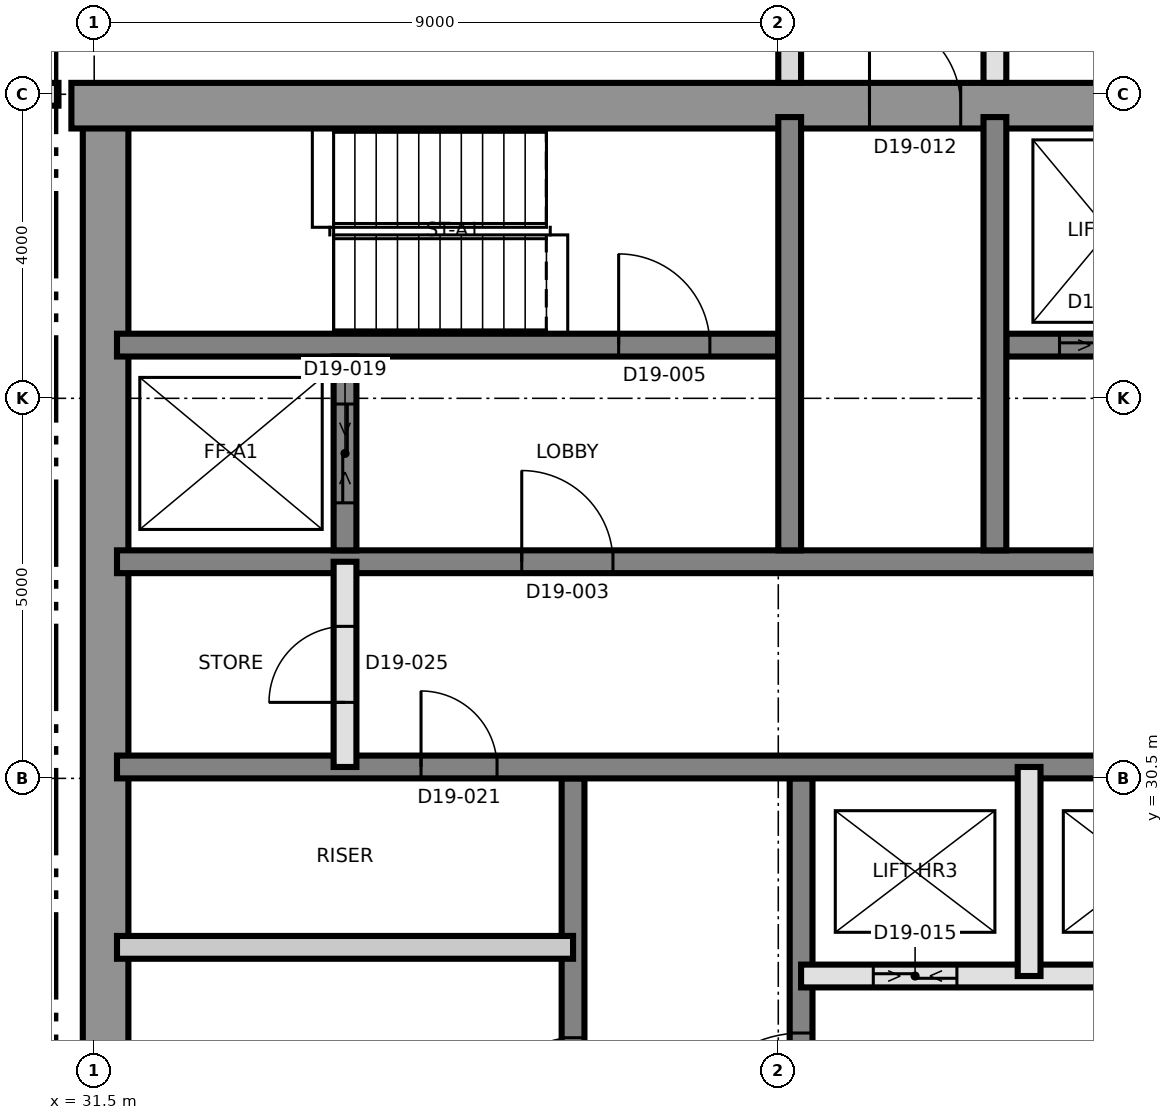
"""IFC4 building model, lengths in metres.
Left out: names, types, materials, properties, quantities, classifications, styles, units other than length and angle.
Written with IfcOpenShell. Run it as: python <this file> out.ifc"""

import sys

from ifc_helpers import new_model, si_unit, direction, frame, frame_2d, origin, place, context, subcontext, project, spatial, rectangle, extrude, element, fill, save


model = new_model("IFC4")
c1 = context("Model", 3, precision=1e-05, world=origin(), true_north=direction((0.0, 1.0)))
c2 = subcontext(c1, "Body", "Model", "MODEL_VIEW")
j1 = project(units=[si_unit("LENGTHUNIT", "METRE"), si_unit("PLANEANGLEUNIT", "RADIAN")], contexts=[c1])
p1 = place(None, origin())
s1 = spatial("IfcSite", under=j1, at=p1, CompositionType="ELEMENT")
p2 = place(p1, origin())
s2 = spatial("IfcBuilding", under=s1, at=p2, CompositionType="ELEMENT")
p3 = place(p2, frame((0.0, 0.0, 179.2)))
s3 = spatial("IfcBuildingStorey", under=s2, at=p3, CompositionType="ELEMENT", Elevation=179.2)
p4 = place(p3, frame((31.65, 21.8, 0.0), z_axis=(0.0, 0.0, 1.0), x_axis=(0.0, 1.0, 0.0)))
e1 = element("IfcWall", 1, at=p4, inside=s3, PredefinedType="SHEAR", context=c2, shape_type="SweptSolid", body=[
    extrude(rectangle(XDim=17.4, YDim=0.6, at=frame_2d((8.7, 0.0))), origin(), (0.0, 0.0, 1.0), 3.7),
])
p5 = place(p3, frame((31.2, 39.35, 0.0), z_axis=(0.0, 0.0, 1.0), x_axis=(1.0, 0.0, 0.0)))
e2 = element("IfcWall", 2, at=p5, inside=s3, PredefinedType="SHEAR", context=c2, shape_type="SweptSolid", body=[
    extrude(rectangle(XDim=27.0, YDim=0.6, at=frame_2d((13.5, 0.0))), origin(), (0.0, 0.0, 1.0), 3.7),
])
p6 = place(p5, frame((10.5, 0.0, 0.0)))
e3 = element("IfcOpeningElement", 3, at=p6, cuts=e2, PredefinedType="OPENING", context=c2, shape_type="SweptSolid", body=[
    extrude(rectangle(XDim=1.2, YDim=2.1, at=frame_2d((0.6, 1.05))), frame((0.0, 0.31, 0.0), z_axis=(0.0, -1.0, 0.0), x_axis=(1.0, 0.0, 0.0)), (0.0, 0.0, 1.0), 0.62),
])
p7 = place(p3, frame((37.8, 21.8, 0.0), z_axis=(0.0, 0.0, 1.0), x_axis=(0.0, 1.0, 0.0)))
e4 = element("IfcWall", 4, at=p7, inside=s3, PredefinedType="SHEAR", context=c2, shape_type="SweptSolid", body=[
    extrude(rectangle(XDim=8.7, YDim=0.3, at=frame_2d((4.35, 0.0))), origin(), (0.0, 0.0, 1.0), 3.7),
])
p8 = place(p7, frame((4.288, 0.0, 0.0)))
e5 = element("IfcOpeningElement", 5, at=p8, cuts=e4, PredefinedType="OPENING", context=c2, shape_type="SweptSolid", body=[
    extrude(rectangle(XDim=1.0, YDim=2.1, at=frame_2d((0.5, 1.05))), frame((0.0, 0.16, 0.0), z_axis=(0.0, -1.0, 0.0), x_axis=(1.0, 0.0, 0.0)), (0.0, 0.0, 1.0), 0.32),
])
p9 = place(p3, frame((40.8, 21.8, 0.0), z_axis=(0.0, 0.0, 1.0), x_axis=(0.0, 1.0, 0.0)))
e6 = element("IfcWall", 6, at=p9, inside=s3, PredefinedType="SHEAR", context=c2, shape_type="SweptSolid", body=[
    extrude(rectangle(XDim=8.7, YDim=0.3, at=frame_2d((4.35, 0.0))), origin(), (0.0, 0.0, 1.0), 3.7),
])
p10 = place(p9, frame((3.85, 0.0, 0.0)))
e7 = element("IfcOpeningElement", 7, at=p10, cuts=e6, PredefinedType="OPENING", context=c2, shape_type="SweptSolid", body=[
    extrude(rectangle(XDim=1.5, YDim=2.1, at=frame_2d((0.75, 1.05))), frame((0.0, 0.16, 0.0), z_axis=(0.0, -1.0, 0.0), x_axis=(1.0, 0.0, 0.0)), (0.0, 0.0, 1.0), 0.32),
])
p11 = place(p3, frame((31.8, 30.65, 0.0), z_axis=(0.0, 0.0, 1.0), x_axis=(1.0, 0.0, 0.0)))
e8 = element("IfcWall", 8, at=p11, inside=s3, PredefinedType="SHEAR", context=c2, shape_type="SweptSolid", body=[
    extrude(rectangle(XDim=26.4, YDim=0.3, at=frame_2d((13.2, 0.0))), origin(), (0.0, 0.0, 1.0), 3.7),
])
p12 = place(p11, frame((24.7, 0.0, 0.0)))
e9 = element("IfcOpeningElement", 9, at=p12, cuts=e8, PredefinedType="OPENING", context=c2, shape_type="SweptSolid", body=[
    extrude(rectangle(XDim=1.0, YDim=2.1, at=frame_2d((0.5, 1.05))), frame((0.0, 0.16, 0.0), z_axis=(0.0, -1.0, 0.0), x_axis=(1.0, 0.0, 0.0)), (0.0, 0.0, 1.0), 0.32),
])
p13 = place(p11, frame((4.0, 0.0, 0.0)))
e10 = element("IfcOpeningElement", 10, at=p13, cuts=e8, PredefinedType="OPENING", context=c2, shape_type="SweptSolid", body=[
    extrude(rectangle(XDim=1.0, YDim=2.1, at=frame_2d((0.5, 1.05))), frame((0.0, 0.16, 0.0), z_axis=(0.0, -1.0, 0.0), x_axis=(1.0, 0.0, 0.0)), (0.0, 0.0, 1.0), 0.32),
])
p14 = place(p3, frame((31.8, 33.35, 0.0), z_axis=(0.0, 0.0, 1.0), x_axis=(1.0, 0.0, 0.0)))
e11 = element("IfcWall", 11, at=p14, inside=s3, PredefinedType="SHEAR", context=c2, shape_type="SweptSolid", body=[
    extrude(rectangle(XDim=26.4, YDim=0.3, at=frame_2d((13.2, 0.0))), origin(), (0.0, 0.0, 1.0), 3.7),
])
p15 = place(p14, frame((13.85, 0.0, 0.0)))
e12 = element("IfcOpeningElement", 12, at=p15, cuts=e11, PredefinedType="OPENING", context=c2, shape_type="SweptSolid", body=[
    extrude(rectangle(XDim=1.4, YDim=2.1, at=frame_2d((0.7, 1.05))), frame((0.0, 0.16, 0.0), z_axis=(0.0, -1.0, 0.0), x_axis=(1.0, 0.0, 0.0)), (0.0, 0.0, 1.0), 0.32),
])
p16 = place(p14, frame((5.325, 0.0, 0.0)))
e13 = element("IfcOpeningElement", 13, at=p16, cuts=e11, PredefinedType="OPENING", context=c2, shape_type="SweptSolid", body=[
    extrude(rectangle(XDim=1.2, YDim=2.1, at=frame_2d((0.6, 1.05))), frame((0.0, 0.16, 0.0), z_axis=(0.0, -1.0, 0.0), x_axis=(1.0, 0.0, 0.0)), (0.0, 0.0, 1.0), 0.32),
])
p17 = place(p14, frame((19.875, 0.0, 0.0)))
e14 = element("IfcOpeningElement", 14, at=p17, cuts=e11, PredefinedType="OPENING", context=c2, shape_type="SweptSolid", body=[
    extrude(rectangle(XDim=1.2, YDim=2.1, at=frame_2d((0.6, 1.05))), frame((0.0, 0.16, 0.0), z_axis=(0.0, -1.0, 0.0), x_axis=(1.0, 0.0, 0.0)), (0.0, 0.0, 1.0), 0.32),
])
p18 = place(p3, frame((31.8, 36.2, 0.0), z_axis=(0.0, 0.0, 1.0), x_axis=(1.0, 0.0, 0.0)))
e15 = element("IfcWall", 15, at=p18, inside=s3, PredefinedType="SHEAR", context=c2, shape_type="SweptSolid", body=[
    extrude(rectangle(XDim=8.7, YDim=0.3, at=frame_2d((4.35, 0.0))), origin(), (0.0, 0.0, 1.0), 3.7),
])
p19 = place(p18, frame((6.6, 0.0, 0.0)))
e16 = element("IfcOpeningElement", 16, at=p19, cuts=e15, PredefinedType="OPENING", context=c2, shape_type="SweptSolid", body=[
    extrude(rectangle(XDim=1.2, YDim=2.1, at=frame_2d((0.6, 1.05))), frame((0.0, 0.16, 0.0), z_axis=(0.0, -1.0, 0.0), x_axis=(1.0, 0.0, 0.0)), (0.0, 0.0, 1.0), 0.32),
])
p20 = place(p3, frame((43.5, 36.2, 0.0), z_axis=(0.0, 0.0, 1.0), x_axis=(1.0, 0.0, 0.0)))
e17 = element("IfcWall", 17, at=p20, inside=s3, PredefinedType="SHEAR", context=c2, shape_type="SweptSolid", body=[
    extrude(rectangle(XDim=14.7, YDim=0.3, at=frame_2d((7.35, 0.0))), origin(), (0.0, 0.0, 1.0), 3.7),
])
p21 = place(p20, frame((6.9, 0.0, 0.0)))
e18 = element("IfcOpeningElement", 18, at=p21, cuts=e17, PredefinedType="OPENING", context=c2, shape_type="SweptSolid", body=[
    extrude(rectangle(XDim=1.2, YDim=2.1, at=frame_2d((0.6, 1.05))), frame((0.0, 0.16, 0.0), z_axis=(0.0, -1.0, 0.0), x_axis=(1.0, 0.0, 0.0)), (0.0, 0.0, 1.0), 0.32),
])
p22 = place(p20, frame((0.7, 0.0, 0.0)))
e19 = element("IfcOpeningElement", 19, at=p22, cuts=e17, PredefinedType="OPENING", context=c2, shape_type="SweptSolid", body=[
    extrude(rectangle(XDim=1.3, YDim=2.4, at=frame_2d((0.65, 1.2))), frame((0.0, 0.16, 0.0), z_axis=(0.0, -1.0, 0.0), x_axis=(1.0, 0.0, 0.0)), (0.0, 0.0, 1.0), 0.32),
])
p23 = place(p20, frame((3.7, 0.0, 0.0)))
e20 = element("IfcOpeningElement", 20, at=p23, cuts=e17, PredefinedType="OPENING", context=c2, shape_type="SweptSolid", body=[
    extrude(rectangle(XDim=1.3, YDim=2.4, at=frame_2d((0.65, 1.2))), frame((0.0, 0.16, 0.0), z_axis=(0.0, -1.0, 0.0), x_axis=(1.0, 0.0, 0.0)), (0.0, 0.0, 1.0), 0.32),
])
for number, where, z_axis, x_axis in (
    (21, (40.65, 33.5, 0.0), (0.0, 0.0, 1.0), (0.0, 1.0, 0.0)),
    (22, (43.35, 33.5, 0.0), (0.0, 0.0, 1.0), (0.0, 1.0, 0.0)),
):
    element("IfcWall", number, at=place(p3, frame(where, z_axis=z_axis, x_axis=x_axis)), inside=s3, PredefinedType="SHEAR", context=c2, shape_type="SweptSolid", body=[
        extrude(rectangle(XDim=5.7, YDim=0.3, at=frame_2d((2.85, 0.0))), origin(), (0.0, 0.0, 1.0), 3.7),
    ])
p24 = place(p3, frame((34.8, 33.5, 0.0), z_axis=(0.0, 0.0, 1.0), x_axis=(0.0, 1.0, 0.0)))
e23 = element("IfcWall", 23, at=p24, inside=s3, PredefinedType="SHEAR", context=c2, shape_type="SweptSolid", body=[
    extrude(rectangle(XDim=2.55, YDim=0.3, at=frame_2d((1.275, 0.0))), origin(), (0.0, 0.0, 1.0), 3.7),
])
p25 = place(p24, frame((0.625, 0.0, 0.0)))
e24 = element("IfcOpeningElement", 24, at=p25, cuts=e23, PredefinedType="OPENING", context=c2, shape_type="SweptSolid", body=[
    extrude(rectangle(XDim=1.3, YDim=2.4, at=frame_2d((0.65, 1.2))), frame((0.0, 0.16, 0.0), z_axis=(0.0, -1.0, 0.0), x_axis=(1.0, 0.0, 0.0)), (0.0, 0.0, 1.0), 0.32),
])
p26 = place(p3, frame((30.119, 28.24, 0.0), z_axis=(0.0, 0.0, 1.0), x_axis=(0.442319080682, -0.896857753975, 0.0)))
e25 = element("IfcWall", 25, at=p26, inside=s3, PredefinedType="SOLIDWALL", context=c2, shape_type="SweptSolid", body=[
    extrude(rectangle(XDim=1.618, YDim=0.3, at=frame_2d((0.809, 0.0))), origin(), (0.0, 0.0, 1.0), 3.4),
])
p27 = place(p3, frame((40.8, 27.9, 0.0), z_axis=(0.0, 0.0, 1.0), x_axis=(1.0, 0.0, 0.0)))
e26 = element("IfcWall", 26, at=p27, inside=s3, PredefinedType="SOLIDWALL", context=c2, shape_type="SweptSolid", body=[
    extrude(rectangle(XDim=6.0, YDim=0.3, at=frame_2d((3.0, 0.0))), origin(), (0.0, 0.0, 1.0), 3.4),
])
p28 = place(p27, frame((0.95, 0.0, 0.0)))
e27 = element("IfcOpeningElement", 27, at=p28, cuts=e26, PredefinedType="OPENING", context=c2, shape_type="SweptSolid", body=[
    extrude(rectangle(XDim=1.1, YDim=2.4, at=frame_2d((0.55, 1.2))), frame((0.0, 0.16, 0.0), z_axis=(0.0, -1.0, 0.0), x_axis=(1.0, 0.0, 0.0)), (0.0, 0.0, 1.0), 0.32),
])
p29 = place(p27, frame((3.95, 0.0, 0.0)))
e28 = element("IfcOpeningElement", 28, at=p29, cuts=e26, PredefinedType="OPENING", context=c2, shape_type="SweptSolid", body=[
    extrude(rectangle(XDim=1.1, YDim=2.4, at=frame_2d((0.55, 1.2))), frame((0.0, 0.16, 0.0), z_axis=(0.0, -1.0, 0.0), x_axis=(1.0, 0.0, 0.0)), (0.0, 0.0, 1.0), 0.32),
])
p30 = place(p3, frame((31.8, 28.277, 0.0), z_axis=(0.0, 0.0, 1.0), x_axis=(1.0, 0.0, 0.0)))
e29 = element("IfcWall", 29, at=p30, inside=s3, PredefinedType="PARTITIONING", context=c2, shape_type="SweptSolid", body=[
    extrude(rectangle(XDim=6.0, YDim=0.3, at=frame_2d((3.0, 0.0))), origin(), (0.0, 0.0, 1.0), 3.4),
])
p31 = place(p3, frame((34.8, 30.65, 0.0), z_axis=(0.0, 0.0, 1.0), x_axis=(0.0, 1.0, 0.0)))
e30 = element("IfcWall", 30, at=p31, inside=s3, PredefinedType="SOLIDWALL", context=c2, shape_type="SweptSolid", body=[
    extrude(rectangle(XDim=2.7, YDim=0.3, at=frame_2d((1.35, 0.0))), origin(), (0.0, 0.0, 1.0), 3.4),
])
p32 = place(p31, frame((0.85, 0.0, 0.0)))
e31 = element("IfcOpeningElement", 31, at=p32, cuts=e30, PredefinedType="OPENING", context=c2, shape_type="SweptSolid", body=[
    extrude(rectangle(XDim=1.0, YDim=2.1, at=frame_2d((0.5, 1.05))), frame((0.0, 0.16, 0.0), z_axis=(0.0, -1.0, 0.0), x_axis=(1.0, 0.0, 0.0)), (0.0, 0.0, 1.0), 0.32),
])
p33 = place(p3, frame((43.8, 27.9, 0.0), z_axis=(0.0, 0.0, 1.0), x_axis=(0.0, 1.0, 0.0)))
e32 = element("IfcWall", 32, at=p33, inside=s3, PredefinedType="SOLIDWALL", context=c2, shape_type="SweptSolid", body=[
    extrude(rectangle(XDim=2.75, YDim=0.3, at=frame_2d((1.375, 0.0))), origin(), (0.0, 0.0, 1.0), 3.4),
])
p34 = place(p3, frame((29.17, 39.5, 0.0), z_axis=(0.0, 0.0, 1.0), x_axis=(1.0, 0.0, 0.0)))
e33 = element("IfcWall", 33, at=p34, inside=s3, PredefinedType="PARTITIONING", context=c2, shape_type="SweptSolid", body=[
    extrude(rectangle(XDim=1.86, YDim=0.3, at=frame_2d((0.93, 0.0))), origin(), (0.0, 0.0, 1.0), 3.4),
])
p35 = place(p3, frame((40.65, 39.65, 0.0), z_axis=(0.0, 0.0, 1.0), x_axis=(0.0, 1.0, 0.0)))
e34 = element("IfcWall", 34, at=p35, inside=s3, PredefinedType="PARTITIONING", context=c2, shape_type="SweptSolid", body=[
    extrude(rectangle(XDim=37.35, YDim=0.3, at=frame_2d((18.675, 0.0))), origin(), (0.0, 0.0, 1.0), 3.4),
])
p36 = place(p35, frame((0.88, 0.0, 0.0)))
e35 = element("IfcOpeningElement", 35, at=p36, cuts=e34, PredefinedType="OPENING", context=c2, shape_type="SweptSolid", body=[
    extrude(rectangle(XDim=1.0, YDim=2.1, at=frame_2d((0.5, 1.05))), frame((0.0, 0.16, 0.0), z_axis=(0.0, -1.0, 0.0), x_axis=(1.0, 0.0, 0.0)), (0.0, 0.0, 1.0), 0.32),
])
p37 = place(p35, frame((6.73, 0.0, 0.0)))
e36 = element("IfcOpeningElement", 36, at=p37, cuts=e34, PredefinedType="OPENING", context=c2, shape_type="SweptSolid", body=[
    extrude(rectangle(XDim=1.0, YDim=2.1, at=frame_2d((0.5, 1.05))), frame((0.0, 0.16, 0.0), z_axis=(0.0, -1.0, 0.0), x_axis=(1.0, 0.0, 0.0)), (0.0, 0.0, 1.0), 0.32),
])
p38 = place(p35, frame((12.265, 0.0, 0.0)))
e37 = element("IfcOpeningElement", 37, at=p38, cuts=e34, PredefinedType="OPENING", context=c2, shape_type="SweptSolid", body=[
    extrude(rectangle(XDim=1.0, YDim=2.1, at=frame_2d((0.5, 1.05))), frame((0.0, 0.16, 0.0), z_axis=(0.0, -1.0, 0.0), x_axis=(1.0, 0.0, 0.0)), (0.0, 0.0, 1.0), 0.32),
])
p39 = place(p35, frame((15.215, 0.0, 0.0)))
e38 = element("IfcOpeningElement", 38, at=p39, cuts=e34, PredefinedType="OPENING", context=c2, shape_type="SweptSolid", body=[
    extrude(rectangle(XDim=1.4, YDim=2.1, at=frame_2d((0.7, 1.05))), frame((0.0, 0.16, 0.0), z_axis=(0.0, -1.0, 0.0), x_axis=(1.0, 0.0, 0.0)), (0.0, 0.0, 1.0), 0.32),
])
p40 = place(p35, frame((21.35, 0.0, 0.0)))
e39 = element("IfcOpeningElement", 39, at=p40, cuts=e34, PredefinedType="OPENING", context=c2, shape_type="SweptSolid", body=[
    extrude(rectangle(XDim=1.0, YDim=2.4, at=frame_2d((0.5, 1.2))), frame((0.0, 0.16, 0.0), z_axis=(0.0, -1.0, 0.0), x_axis=(1.0, 0.0, 0.0)), (0.0, 0.0, 1.0), 0.32),
])
p41 = place(p3, frame((43.35, 39.65, 0.0), z_axis=(0.0, 0.0, 1.0), x_axis=(0.0, 1.0, 0.0)))
e40 = element("IfcWall", 40, at=p41, inside=s3, PredefinedType="SOLIDWALL", context=c2, shape_type="SweptSolid", body=[
    extrude(rectangle(XDim=26.15, YDim=0.3, at=frame_2d((13.075, 0.0))), origin(), (0.0, 0.0, 1.0), 3.4),
])
p42 = place(p41, frame((3.265, 0.0, 0.0)))
e41 = element("IfcOpeningElement", 41, at=p42, cuts=e40, PredefinedType="OPENING", context=c2, shape_type="SweptSolid", body=[
    extrude(rectangle(XDim=1.0, YDim=2.1, at=frame_2d((0.5, 1.05))), frame((0.0, 0.16, 0.0), z_axis=(0.0, -1.0, 0.0), x_axis=(1.0, 0.0, 0.0)), (0.0, 0.0, 1.0), 0.32),
])
p43 = place(p41, frame((6.215, 0.0, 0.0)))
e42 = element("IfcOpeningElement", 42, at=p43, cuts=e40, PredefinedType="OPENING", context=c2, shape_type="SweptSolid", body=[
    extrude(rectangle(XDim=1.4, YDim=2.1, at=frame_2d((0.7, 1.05))), frame((0.0, 0.16, 0.0), z_axis=(0.0, -1.0, 0.0), x_axis=(1.0, 0.0, 0.0)), (0.0, 0.0, 1.0), 0.32),
])
p44 = place(p41, frame((9.985, 0.0, 0.0)))
e43 = element("IfcOpeningElement", 43, at=p44, cuts=e40, PredefinedType="OPENING", context=c2, shape_type="SweptSolid", body=[
    extrude(rectangle(XDim=1.2, YDim=2.1, at=frame_2d((0.6, 1.05))), frame((0.0, 0.16, 0.0), z_axis=(0.0, -1.0, 0.0), x_axis=(1.0, 0.0, 0.0)), (0.0, 0.0, 1.0), 0.32),
])
p45 = place(p41, frame((13.235, 0.0, 0.0)))
e44 = element("IfcOpeningElement", 44, at=p45, cuts=e40, PredefinedType="OPENING", context=c2, shape_type="SweptSolid", body=[
    extrude(rectangle(XDim=1.0, YDim=2.1, at=frame_2d((0.5, 1.05))), frame((0.0, 0.16, 0.0), z_axis=(0.0, -1.0, 0.0), x_axis=(1.0, 0.0, 0.0)), (0.0, 0.0, 1.0), 0.32),
])
p46 = place(p41, frame((21.4, 0.0, 0.0)))
e45 = element("IfcOpeningElement", 45, at=p46, cuts=e40, PredefinedType="OPENING", context=c2, shape_type="SweptSolid", body=[
    extrude(rectangle(XDim=1.0, YDim=2.4, at=frame_2d((0.5, 1.2))), frame((0.0, 0.16, 0.0), z_axis=(0.0, -1.0, 0.0), x_axis=(1.0, 0.0, 0.0)), (0.0, 0.0, 1.0), 0.32),
])
p47 = place(p10, origin())
e46 = element("IfcDoor", 46, at=p47, inside=s3, OperationType="SINGLE_SWING_RIGHT", PredefinedType="DOOR", context=c2, shape_type="SweptSolid", body=[
    extrude(rectangle(XDim=1.5, YDim=2.1, at=frame_2d((0.75, 1.05))), frame((0.0, 0.025, 0.0), z_axis=(0.0, -1.0, 0.0), x_axis=(1.0, 0.0, 0.0)), (0.0, 0.0, 1.0), 0.05),
])
fill(e7, e46)
p48 = place(p16, origin())
e47 = element("IfcDoor", 47, at=p48, inside=s3, OperationType="SINGLE_SWING_LEFT", PredefinedType="DOOR", context=c2, shape_type="SweptSolid", body=[
    extrude(rectangle(XDim=1.2, YDim=2.1, at=frame_2d((0.6, 1.05))), frame((0.0, 0.025, 0.0), z_axis=(0.0, -1.0, 0.0), x_axis=(1.0, 0.0, 0.0)), (0.0, 0.0, 1.0), 0.05),
])
fill(e13, e47)
p49 = place(p19, origin())
e48 = element("IfcDoor", 48, at=p49, inside=s3, OperationType="SINGLE_SWING_RIGHT", PredefinedType="DOOR", context=c2, shape_type="SweptSolid", body=[
    extrude(rectangle(XDim=1.2, YDim=2.1, at=frame_2d((0.6, 1.05))), frame((0.0, 0.025, 0.0), z_axis=(0.0, -1.0, 0.0), x_axis=(1.0, 0.0, 0.0)), (0.0, 0.0, 1.0), 0.05),
])
fill(e16, e48)
p50 = place(p6, origin())
e49 = element("IfcDoor", 49, at=p50, inside=s3, OperationType="SINGLE_SWING_RIGHT", PredefinedType="DOOR", context=c2, shape_type="SweptSolid", body=[
    extrude(rectangle(XDim=1.2, YDim=2.1, at=frame_2d((0.6, 1.05))), frame((0.0, 0.025, 0.0), z_axis=(0.0, -1.0, 0.0), x_axis=(1.0, 0.0, 0.0)), (0.0, 0.0, 1.0), 0.05),
])
fill(e3, e49)
p51 = place(p28, origin())
e50 = element("IfcDoor", 50, at=p51, inside=s3, OperationType="SLIDING_TO_LEFT", PredefinedType="DOOR", context=c2, shape_type="SweptSolid", body=[
    extrude(rectangle(XDim=1.1, YDim=2.4, at=frame_2d((0.55, 1.2))), frame((0.0, 0.025, 0.0), z_axis=(0.0, -1.0, 0.0), x_axis=(1.0, 0.0, 0.0)), (0.0, 0.0, 1.0), 0.05),
])
fill(e27, e50)
p52 = place(p22, origin())
e51 = element("IfcDoor", 51, at=p52, inside=s3, OperationType="SLIDING_TO_LEFT", PredefinedType="DOOR", context=c2, shape_type="SweptSolid", body=[
    extrude(rectangle(XDim=1.3, YDim=2.4, at=frame_2d((0.65, 1.2))), frame((0.0, 0.025, 0.0), z_axis=(0.0, -1.0, 0.0), x_axis=(1.0, 0.0, 0.0)), (0.0, 0.0, 1.0), 0.05),
])
fill(e19, e51)
p53 = place(p25, origin())
e52 = element("IfcDoor", 52, at=p53, inside=s3, OperationType="SLIDING_TO_LEFT", PredefinedType="DOOR", context=c2, shape_type="SweptSolid", body=[
    extrude(rectangle(XDim=1.3, YDim=2.4, at=frame_2d((0.65, 1.2))), frame((0.0, 0.025, 0.0), z_axis=(0.0, -1.0, 0.0), x_axis=(1.0, 0.0, 0.0)), (0.0, 0.0, 1.0), 0.05),
])
fill(e24, e52)
p54 = place(p13, origin())
e53 = element("IfcDoor", 53, at=p54, inside=s3, OperationType="SINGLE_SWING_LEFT", PredefinedType="DOOR", context=c2, shape_type="SweptSolid", body=[
    extrude(rectangle(XDim=1.0, YDim=2.1, at=frame_2d((0.5, 1.05))), frame((0.0, 0.025, 0.0), z_axis=(0.0, -1.0, 0.0), x_axis=(1.0, 0.0, 0.0)), (0.0, 0.0, 1.0), 0.05),
])
fill(e10, e53)
p55 = place(p8, origin())
e54 = element("IfcDoor", 54, at=p55, inside=s3, OperationType="SINGLE_SWING_RIGHT", PredefinedType="DOOR", context=c2, shape_type="SweptSolid", body=[
    extrude(rectangle(XDim=1.0, YDim=2.1, at=frame_2d((0.5, 1.05))), frame((0.0, 0.025, 0.0), z_axis=(0.0, -1.0, 0.0), x_axis=(1.0, 0.0, 0.0)), (0.0, 0.0, 1.0), 0.05),
])
fill(e5, e54)
p56 = place(p32, origin())
e55 = element("IfcDoor", 55, at=p56, inside=s3, OperationType="SINGLE_SWING_LEFT", PredefinedType="DOOR", context=c2, shape_type="SweptSolid", body=[
    extrude(rectangle(XDim=1.0, YDim=2.1, at=frame_2d((0.5, 1.05))), frame((0.0, 0.025, 0.0), z_axis=(0.0, -1.0, 0.0), x_axis=(1.0, 0.0, 0.0)), (0.0, 0.0, 1.0), 0.05),
])
fill(e31, e55)
save(model, sys.argv[1])
